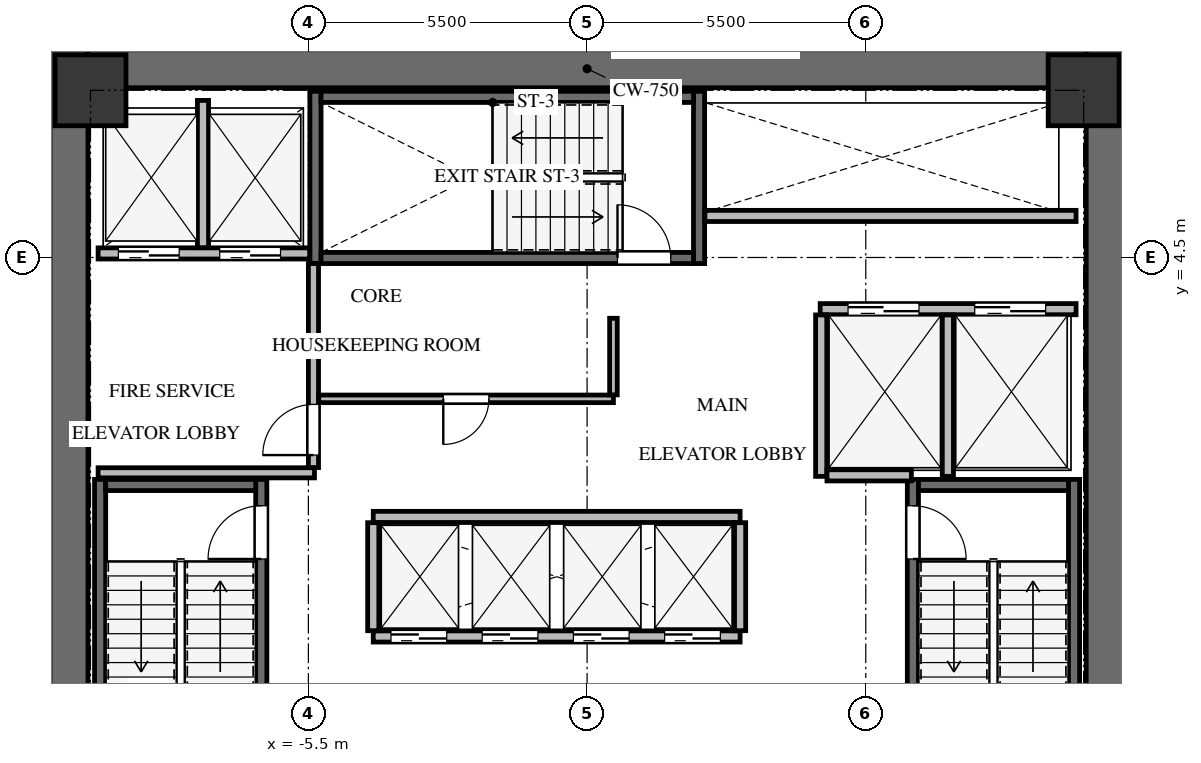
"""IFC4 building model, lengths in metres.
Left out: names, types, materials, properties, quantities, classifications, styles, units other than length and angle.
Written with IfcOpenShell. Run it as: python <this file> out.ifc"""

import sys

from ifc_helpers import new_model, si_unit, direction, frame, frame_2d, origin, origin_2d, place, context, subcontext, project, spatial, rectangle, extrude, source, transform, mapped, element, fill, save


model = new_model("IFC4")
c1 = context("Model", 3, precision=1e-05, world=origin(), true_north=direction((0.0, 1.0)))
c2 = subcontext(c1, "Body", "Model", "MODEL_VIEW")
j1 = project(units=[si_unit("LENGTHUNIT", "METRE"), si_unit("PLANEANGLEUNIT", "RADIAN")], contexts=[c1])
p1 = place(None, origin())
s1 = spatial("IfcSite", under=j1, at=p1, CompositionType="ELEMENT")
p2 = place(p1, origin())
s2 = spatial("IfcBuilding", under=s1, at=p2, CompositionType="ELEMENT")
p3 = place(p2, frame((0.0, 0.0, 127.2)))
s3 = spatial("IfcBuildingStorey", under=s2, at=p3, CompositionType="ELEMENT", Elevation=127.2)
for number, where, z_axis, x_axis in (
    (1, (-10.225, -8.6, 0.0), (0.0, 0.0, 1.0), (0.0, 1.0, 0.0)),
    (2, (10.225, -8.6, 0.0), (0.0, 0.0, 1.0), (0.0, 1.0, 0.0)),
):
    element("IfcWall", number, at=place(p3, frame(where, z_axis=z_axis, x_axis=x_axis)), inside=s3, PredefinedType="SHEAR", context=c2, shape_type="SweptSolid", body=[
        extrude(rectangle(XDim=17.2, YDim=0.75, at=frame_2d((8.6, 0.0))), origin(), (0.0, 0.0, 1.0), 3.3),
    ])
p4 = place(p3, frame((-9.85, 8.225, 0.0), z_axis=(0.0, 0.0, 1.0), x_axis=(1.0, 0.0, 0.0)))
e3 = element("IfcWall", 3, at=p4, inside=s3, PredefinedType="SHEAR", context=c2, shape_type="SweptSolid", body=[
    extrude(rectangle(XDim=19.7, YDim=0.75, at=frame_2d((9.85, 0.0))), origin(), (0.0, 0.0, 1.0), 3.3),
])
p5 = place(p3, frame((-6.43, -7.77, -0.24), z_axis=(0.0, 0.0, 1.0), x_axis=(0.0, 1.0, 0.0)))
e4 = element("IfcWall", 4, at=p5, inside=s3, PredefinedType="SHEAR", context=c2, shape_type="SweptSolid", body=[
    extrude(rectangle(XDim=7.89, YDim=0.22, at=frame_2d((3.945, 0.0))), origin(), (0.0, 0.0, 1.0), 3.3),
])
p6 = place(p5, frame((6.32, 0.0, 0.0)))
e5 = element("IfcOpeningElement", 5, at=p6, cuts=e4, PredefinedType="OPENING", context=c2, shape_type="SweptSolid", body=[
    extrude(rectangle(XDim=1.05, YDim=2.15, at=frame_2d((0.525, 1.075))), frame((0.0, 0.12, 0.0), z_axis=(0.0, -1.0, 0.0), x_axis=(1.0, 0.0, 0.0)), (0.0, 0.0, 1.0), 0.24),
])
p7 = place(p3, frame((-9.61, 0.12, -0.24), z_axis=(0.0, 0.0, 1.0), x_axis=(0.0, -1.0, 0.0)))
e6 = element("IfcWall", 6, at=p7, inside=s3, PredefinedType="SHEAR", context=c2, shape_type="SweptSolid", body=[
    extrude(rectangle(XDim=7.89, YDim=0.22, at=frame_2d((3.945, 0.0))), origin(), (0.0, 0.0, 1.0), 3.3),
])
p8 = place(p3, frame((-6.54, 0.01, -0.24), z_axis=(0.0, 0.0, 1.0), x_axis=(-1.0, 0.0, 0.0)))
e7 = element("IfcWall", 7, at=p8, inside=s3, PredefinedType="SHEAR", context=c2, shape_type="SweptSolid", body=[
    extrude(rectangle(XDim=2.96, YDim=0.22, at=frame_2d((1.48, 0.0))), origin(), (0.0, 0.0, 1.0), 3.3),
])
p9 = place(p3, frame((9.61, -7.77, -0.24), z_axis=(0.0, 0.0, 1.0), x_axis=(0.0, 1.0, 0.0)))
e8 = element("IfcWall", 8, at=p9, inside=s3, PredefinedType="SHEAR", context=c2, shape_type="SweptSolid", body=[
    extrude(rectangle(XDim=7.89, YDim=0.22, at=frame_2d((3.945, 0.0))), origin(), (0.0, 0.0, 1.0), 3.3),
])
p10 = place(p3, frame((6.43, 0.12, -0.24), z_axis=(0.0, 0.0, 1.0), x_axis=(0.0, -1.0, 0.0)))
e9 = element("IfcWall", 9, at=p10, inside=s3, PredefinedType="SHEAR", context=c2, shape_type="SweptSolid", body=[
    extrude(rectangle(XDim=7.89, YDim=0.22, at=frame_2d((3.945, 0.0))), origin(), (0.0, 0.0, 1.0), 3.3),
])
p11 = place(p10, frame((0.52, 0.0, 0.0)))
e10 = element("IfcOpeningElement", 10, at=p11, cuts=e9, PredefinedType="OPENING", context=c2, shape_type="SweptSolid", body=[
    extrude(rectangle(XDim=1.05, YDim=2.15, at=frame_2d((0.525, 1.075))), frame((0.0, 0.12, 0.0), z_axis=(0.0, -1.0, 0.0), x_axis=(1.0, 0.0, 0.0)), (0.0, 0.0, 1.0), 0.24),
])
p12 = place(p3, frame((9.5, 0.01, -0.24), z_axis=(0.0, 0.0, 1.0), x_axis=(-1.0, 0.0, 0.0)))
e11 = element("IfcWall", 11, at=p12, inside=s3, PredefinedType="SHEAR", context=c2, shape_type="SweptSolid", body=[
    extrude(rectangle(XDim=2.96, YDim=0.22, at=frame_2d((1.48, 0.0))), origin(), (0.0, 0.0, 1.0), 3.3),
])
for number, where, z_axis, x_axis in (
    (12, (2.21, 4.38, -0.24), (0.0, 0.0, 1.0), (0.0, 1.0, 0.0)),
    (13, (-5.36, 7.78, -0.24), (0.0, 0.0, 1.0), (0.0, -1.0, 0.0)),
):
    element("IfcWall", number, at=place(p3, frame(where, z_axis=z_axis, x_axis=x_axis)), inside=s3, PredefinedType="SHEAR", context=c2, shape_type="SweptSolid", body=[
        extrude(rectangle(XDim=3.4, YDim=0.22, at=frame_2d((1.7, 0.0))), origin(), (0.0, 0.0, 1.0), 3.3),
    ])
p13 = place(p3, frame((-5.25, 4.49, -0.24), z_axis=(0.0, 0.0, 1.0), x_axis=(1.0, 0.0, 0.0)))
e14 = element("IfcWall", 14, at=p13, inside=s3, PredefinedType="SHEAR", context=c2, shape_type="SweptSolid", body=[
    extrude(rectangle(XDim=7.35, YDim=0.22, at=frame_2d((3.675, 0.0))), origin(), (0.0, 0.0, 1.0), 3.3),
])
p14 = place(p13, frame((5.85, 0.0, 0.0)))
e15 = element("IfcOpeningElement", 15, at=p14, cuts=e14, PredefinedType="OPENING", context=c2, shape_type="SweptSolid", body=[
    extrude(rectangle(XDim=1.05, YDim=2.15, at=frame_2d((0.525, 1.075))), frame((0.0, 0.12, 0.0), z_axis=(0.0, -1.0, 0.0), x_axis=(1.0, 0.0, 0.0)), (0.0, 0.0, 1.0), 0.24),
])
p15 = place(p3, frame((2.1, 7.67, -0.24), z_axis=(0.0, 0.0, 1.0), x_axis=(-1.0, 0.0, 0.0)))
e16 = element("IfcWall", 16, at=p15, inside=s3, PredefinedType="SHEAR", context=c2, shape_type="SweptSolid", body=[
    extrude(rectangle(XDim=7.35, YDim=0.22, at=frame_2d((3.675, 0.0))), origin(), (0.0, 0.0, 1.0), 3.3),
])
m1 = source(origin(), c2, "Body", "SweptSolid", [
    extrude(rectangle(XDim=1.4, YDim=1.4, at=origin_2d()), origin(), (0.0, 0.0, 1.0), 3.3),
])
for number, where, z_axis, x_axis in (
    (17, (9.8, 7.8, -0.24), (0.0, 0.0, 1.0), (1.0, 0.0, 0.0)),
    (18, (-9.8, 7.8, -0.24), (0.0, 0.0, 1.0), (1.0, 0.0, 0.0)),
):
    element("IfcColumn", number, at=place(p3, frame(where, z_axis=z_axis, x_axis=x_axis)), inside=s3, PredefinedType="COLUMN", context=c2, shape_type="MappedRepresentation", body=[
        mapped(m1, transform((0.0, 0.0, 0.0), x_axis=(1.0, 0.0, 0.0), y_axis=(0.0, 1.0, 0.0), z_axis=(0.0, 0.0, 1.0), scale=1.0)),
    ])
p16 = place(p3, frame((-9.65, 4.58, 0.0), z_axis=(0.0, 0.0, 1.0), x_axis=(1.0, 0.0, 0.0)))
e19 = element("IfcWall", 19, at=p16, inside=s3, PredefinedType="SOLIDWALL", context=c2, shape_type="SweptSolid", body=[
    extrude(rectangle(XDim=4.175, YDim=0.22, at=frame_2d((2.087, 0.0))), origin(), (0.0, 0.0, 1.0), 3.045),
])
p17 = place(p16, frame((0.4, 0.0, 0.0)))
e20 = element("IfcOpeningElement", 20, at=p17, cuts=e19, PredefinedType="OPENING", context=c2, shape_type="SweptSolid", body=[
    extrude(rectangle(XDim=1.2, YDim=2.15, at=frame_2d((0.6, 1.075))), frame((0.0, 0.12, 0.0), z_axis=(0.0, -1.0, 0.0), x_axis=(1.0, 0.0, 0.0)), (0.0, 0.0, 1.0), 0.24),
])
p18 = place(p16, frame((2.4, 0.0, 0.0)))
e21 = element("IfcOpeningElement", 21, at=p18, cuts=e19, PredefinedType="OPENING", context=c2, shape_type="SweptSolid", body=[
    extrude(rectangle(XDim=1.2, YDim=2.15, at=frame_2d((0.6, 1.075))), frame((0.0, 0.12, 0.0), z_axis=(0.0, -1.0, 0.0), x_axis=(1.0, 0.0, 0.0)), (0.0, 0.0, 1.0), 0.24),
])
p19 = place(p3, frame((-7.58, 4.694, 0.0), z_axis=(0.0, 0.0, 1.0), x_axis=(0.0, 1.0, 0.0)))
e22 = element("IfcWall", 22, at=p19, inside=s3, PredefinedType="SOLIDWALL", context=c2, shape_type="SweptSolid", body=[
    extrude(rectangle(XDim=2.906, YDim=0.22, at=frame_2d((1.453, 0.0))), origin(), (0.0, 0.0, 1.0), 3.045),
])
p20 = place(p3, frame((-9.65, 0.25, 0.0), z_axis=(0.0, 0.0, 1.0), x_axis=(1.0, 0.0, 0.0)))
e23 = element("IfcWall", 23, at=p20, inside=s3, PredefinedType="SOLIDWALL", context=c2, shape_type="SweptSolid", body=[
    extrude(rectangle(XDim=4.27, YDim=0.2, at=frame_2d((2.135, 0.0))), origin(), (0.0, 0.0, 1.0), 3.045),
])
p21 = place(p3, frame((-5.4, 0.354, 0.0), z_axis=(0.0, 0.0, 1.0), x_axis=(0.0, 1.0, 0.0)))
e24 = element("IfcWall", 24, at=p21, inside=s3, PredefinedType="SOLIDWALL", context=c2, shape_type="SweptSolid", body=[
    extrude(rectangle(XDim=4.026, YDim=0.2, at=frame_2d((2.013, 0.0))), origin(), (0.0, 0.0, 1.0), 3.045),
])
p22 = place(p21, frame((0.246, 0.0, 0.0)))
e25 = element("IfcOpeningElement", 25, at=p22, cuts=e24, PredefinedType="OPENING", context=c2, shape_type="SweptSolid", body=[
    extrude(rectangle(XDim=1.0, YDim=2.15, at=frame_2d((0.5, 1.075))), frame((0.0, 0.11, 0.0), z_axis=(0.0, -1.0, 0.0), x_axis=(1.0, 0.0, 0.0)), (0.0, 0.0, 1.0), 0.22),
])
p23 = place(p3, frame((4.6, 3.48, 0.0), z_axis=(0.0, 0.0, 1.0), x_axis=(1.0, 0.0, 0.0)))
e26 = element("IfcWall", 26, at=p23, inside=s3, PredefinedType="SOLIDWALL", context=c2, shape_type="SweptSolid", body=[
    extrude(rectangle(XDim=5.05, YDim=0.22, at=frame_2d((2.525, 0.0))), origin(), (0.0, 0.0, 1.0), 3.045),
])
p24 = place(p23, frame((0.55, 0.0, 0.0)))
e27 = element("IfcOpeningElement", 27, at=p24, cuts=e26, PredefinedType="OPENING", context=c2, shape_type="SweptSolid", body=[
    extrude(rectangle(XDim=1.4, YDim=2.15, at=frame_2d((0.7, 1.075))), frame((0.0, 0.12, 0.0), z_axis=(0.0, -1.0, 0.0), x_axis=(1.0, 0.0, 0.0)), (0.0, 0.0, 1.0), 0.24),
])
p25 = place(p23, frame((3.05, 0.0, 0.0)))
e28 = element("IfcOpeningElement", 28, at=p25, cuts=e26, PredefinedType="OPENING", context=c2, shape_type="SweptSolid", body=[
    extrude(rectangle(XDim=1.4, YDim=2.15, at=frame_2d((0.7, 1.075))), frame((0.0, 0.12, 0.0), z_axis=(0.0, -1.0, 0.0), x_axis=(1.0, 0.0, 0.0)), (0.0, 0.0, 1.0), 0.24),
])
for number, where, z_axis, x_axis in (
    (29, (4.62, 0.18, 0.0), (0.0, 0.0, 1.0), (0.0, 1.0, 0.0)),
    (30, (7.12, 0.18, 0.0), (0.0, 0.0, 1.0), (0.0, 1.0, 0.0)),
):
    element("IfcWall", number, at=place(p3, frame(where, z_axis=z_axis, x_axis=x_axis)), inside=s3, PredefinedType="SOLIDWALL", context=c2, shape_type="SweptSolid", body=[
        extrude(rectangle(XDim=3.186, YDim=0.22, at=frame_2d((1.593, 0.0))), origin(), (0.0, 0.0, 1.0), 3.045),
    ])
p26 = place(p3, frame((4.734, 0.2, 0.0), z_axis=(0.0, 0.0, 1.0), x_axis=(1.0, 0.0, 0.0)))
e31 = element("IfcWall", 31, at=p26, inside=s3, PredefinedType="SOLIDWALL", context=c2, shape_type="SweptSolid", body=[
    extrude(rectangle(XDim=1.666, YDim=0.22, at=frame_2d((0.833, 0.0))), origin(), (0.0, 0.0, 1.0), 3.045),
])
p27 = place(p3, frame((-4.22, -2.98, 0.0), z_axis=(0.0, 0.0, 1.0), x_axis=(1.0, 0.0, 0.0)))
e32 = element("IfcWall", 32, at=p27, inside=s3, PredefinedType="SOLIDWALL", context=c2, shape_type="SweptSolid", body=[
    extrude(rectangle(XDim=7.24, YDim=0.22, at=frame_2d((3.62, 0.0))), origin(), (0.0, 0.0, 1.0), 3.045),
])
p28 = place(p27, frame((0.35, 0.0, 0.0)))
e33 = element("IfcOpeningElement", 33, at=p28, cuts=e32, PredefinedType="OPENING", context=c2, shape_type="SweptSolid", body=[
    extrude(rectangle(XDim=1.1, YDim=2.15, at=frame_2d((0.55, 1.075))), frame((0.0, 0.12, 0.0), z_axis=(0.0, -1.0, 0.0), x_axis=(1.0, 0.0, 0.0)), (0.0, 0.0, 1.0), 0.24),
])
p29 = place(p27, frame((2.15, 0.0, 0.0)))
e34 = element("IfcOpeningElement", 34, at=p29, cuts=e32, PredefinedType="OPENING", context=c2, shape_type="SweptSolid", body=[
    extrude(rectangle(XDim=1.1, YDim=2.15, at=frame_2d((0.55, 1.075))), frame((0.0, 0.12, 0.0), z_axis=(0.0, -1.0, 0.0), x_axis=(1.0, 0.0, 0.0)), (0.0, 0.0, 1.0), 0.24),
])
p30 = place(p27, frame((3.95, 0.0, 0.0)))
e35 = element("IfcOpeningElement", 35, at=p30, cuts=e32, PredefinedType="OPENING", context=c2, shape_type="SweptSolid", body=[
    extrude(rectangle(XDim=1.1, YDim=2.15, at=frame_2d((0.55, 1.075))), frame((0.0, 0.12, 0.0), z_axis=(0.0, -1.0, 0.0), x_axis=(1.0, 0.0, 0.0)), (0.0, 0.0, 1.0), 0.24),
])
p31 = place(p27, frame((5.75, 0.0, 0.0)))
e36 = element("IfcOpeningElement", 36, at=p31, cuts=e32, PredefinedType="OPENING", context=c2, shape_type="SweptSolid", body=[
    extrude(rectangle(XDim=1.1, YDim=2.15, at=frame_2d((0.55, 1.075))), frame((0.0, 0.12, 0.0), z_axis=(0.0, -1.0, 0.0), x_axis=(1.0, 0.0, 0.0)), (0.0, 0.0, 1.0), 0.24),
])
p32 = place(p3, frame((-4.22, -0.62, 0.0), z_axis=(0.0, 0.0, 1.0), x_axis=(1.0, 0.0, 0.0)))
e37 = element("IfcWall", 37, at=p32, inside=s3, PredefinedType="SOLIDWALL", context=c2, shape_type="SweptSolid", body=[
    extrude(rectangle(XDim=7.24, YDim=0.22, at=frame_2d((3.62, 0.0))), origin(), (0.0, 0.0, 1.0), 3.045),
])
for number, where, z_axis, x_axis in (
    (38, (-4.22, -2.866, 0.0), (0.0, 0.0, 1.0), (0.0, 1.0, 0.0)),
    (39, (3.02, -2.866, 0.0), (0.0, 0.0, 1.0), (0.0, 1.0, 0.0)),
):
    element("IfcWall", number, at=place(p3, frame(where, z_axis=z_axis, x_axis=x_axis)), inside=s3, PredefinedType="SOLIDWALL", context=c2, shape_type="SweptSolid", body=[
        extrude(rectangle(XDim=2.132, YDim=0.22, at=frame_2d((1.066, 0.0))), origin(), (0.0, 0.0, 1.0), 3.045),
    ])
p33 = place(p3, frame((2.325, 5.32, 0.0), z_axis=(0.0, 0.0, 1.0), x_axis=(1.0, 0.0, 0.0)))
e40 = element("IfcWall", 40, at=p33, inside=s3, PredefinedType="SOLIDWALL", context=c2, shape_type="SweptSolid", body=[
    extrude(rectangle(XDim=7.325, YDim=0.22, at=frame_2d((3.663, 0.0))), origin(), (0.0, 0.0, 1.0), 3.045),
])
p34 = place(p3, frame((0.52, 1.71, 0.0), z_axis=(0.0, 0.0, 1.0), x_axis=(-1.0, 0.0, 0.0)))
e41 = element("IfcWall", 41, at=p34, inside=s3, PredefinedType="PARTITIONING", context=c2, shape_type="SweptSolid", body=[
    extrude(rectangle(XDim=5.816, YDim=0.15, at=frame_2d((2.908, 0.0))), origin(), (0.0, 0.0, 1.0), 3.045),
])
p35 = place(p34, frame((2.458, 0.0, 0.0)))
e42 = element("IfcOpeningElement", 42, at=p35, cuts=e41, PredefinedType="OPENING", context=c2, shape_type="SweptSolid", body=[
    extrude(rectangle(XDim=0.9, YDim=2.05, at=frame_2d((0.45, 1.025))), frame((0.0, 0.085, 0.0), z_axis=(0.0, -1.0, 0.0), x_axis=(1.0, 0.0, 0.0)), (0.0, 0.0, 1.0), 0.17),
])
p36 = place(p3, frame((0.52, 3.3, 0.0), z_axis=(0.0, 0.0, 1.0), x_axis=(0.0, -1.0, 0.0)))
e43 = element("IfcWall", 43, at=p36, inside=s3, PredefinedType="PARTITIONING", context=c2, shape_type="SweptSolid", body=[
    extrude(rectangle(XDim=1.511, YDim=0.15, at=frame_2d((0.755, 0.0))), origin(), (0.0, 0.0, 1.0), 3.045),
])
m2 = source(origin(), c2, "Body", "SweptSolid", [
    extrude(rectangle(XDim=1.05, YDim=2.15, at=frame_2d((0.525, 1.075))), frame((0.0, 0.025, 0.0), z_axis=(0.0, -1.0, 0.0), x_axis=(1.0, 0.0, 0.0)), (0.0, 0.0, 1.0), 0.05),
])
p37 = place(p6, origin())
e44 = element("IfcDoor", 44, at=p37, inside=s3, OperationType="SINGLE_SWING_LEFT", PredefinedType="DOOR", context=c2, shape_type="MappedRepresentation", body=[
    mapped(m2, transform((0.0, 0.0, 0.0), x_axis=(1.0, 0.0, 0.0), y_axis=(0.0, 1.0, 0.0), z_axis=(0.0, 0.0, 1.0), scale=1.0)),
])
fill(e5, e44)
m3 = source(origin(), c2, "Body", "SweptSolid", [
    extrude(rectangle(XDim=1.05, YDim=2.15, at=frame_2d((0.525, 1.075))), frame((0.0, 0.025, 0.0), z_axis=(0.0, -1.0, 0.0), x_axis=(1.0, 0.0, 0.0)), (0.0, 0.0, 1.0), 0.05),
])
p38 = place(p11, origin())
e45 = element("IfcDoor", 45, at=p38, inside=s3, OperationType="SINGLE_SWING_RIGHT", PredefinedType="DOOR", context=c2, shape_type="MappedRepresentation", body=[
    mapped(m3, transform((0.0, 0.0, 0.0), x_axis=(1.0, 0.0, 0.0), y_axis=(0.0, 1.0, 0.0), z_axis=(0.0, 0.0, 1.0), scale=1.0)),
])
fill(e10, e45)
p39 = place(p14, origin())
e46 = element("IfcDoor", 46, at=p39, inside=s3, OperationType="SINGLE_SWING_LEFT", PredefinedType="DOOR", context=c2, shape_type="MappedRepresentation", body=[
    mapped(m2, transform((0.0, 0.0, 0.0), x_axis=(1.0, 0.0, 0.0), y_axis=(0.0, 1.0, 0.0), z_axis=(0.0, 0.0, 1.0), scale=1.0)),
])
fill(e15, e46)
m4 = source(origin(), c2, "Body", "SweptSolid", [
    extrude(rectangle(XDim=1.2, YDim=2.15, at=frame_2d((0.6, 1.075))), frame((0.0, 0.025, 0.0), z_axis=(0.0, -1.0, 0.0), x_axis=(1.0, 0.0, 0.0)), (0.0, 0.0, 1.0), 0.05),
])
p40 = place(p17, origin())
e47 = element("IfcDoor", 47, at=p40, inside=s3, OperationType="DOUBLE_DOOR_SLIDING", PredefinedType="DOOR", context=c2, shape_type="MappedRepresentation", body=[
    mapped(m4, transform((0.0, 0.0, 0.0), x_axis=(1.0, 0.0, 0.0), y_axis=(0.0, 1.0, 0.0), z_axis=(0.0, 0.0, 1.0), scale=1.0)),
])
fill(e20, e47)
p41 = place(p18, origin())
e48 = element("IfcDoor", 48, at=p41, inside=s3, OperationType="DOUBLE_DOOR_SLIDING", PredefinedType="DOOR", context=c2, shape_type="MappedRepresentation", body=[
    mapped(m4, transform((0.0, 0.0, 0.0), x_axis=(1.0, 0.0, 0.0), y_axis=(0.0, 1.0, 0.0), z_axis=(0.0, 0.0, 1.0), scale=1.0)),
])
fill(e21, e48)
m5 = source(origin(), c2, "Body", "SweptSolid", [
    extrude(rectangle(XDim=1.0, YDim=2.15, at=frame_2d((0.5, 1.075))), frame((0.0, 0.025, 0.0), z_axis=(0.0, -1.0, 0.0), x_axis=(1.0, 0.0, 0.0)), (0.0, 0.0, 1.0), 0.05),
])
p42 = place(p22, origin())
e49 = element("IfcDoor", 49, at=p42, inside=s3, OperationType="SINGLE_SWING_LEFT", PredefinedType="DOOR", context=c2, shape_type="MappedRepresentation", body=[
    mapped(m5, transform((0.0, 0.0, 0.0), x_axis=(1.0, 0.0, 0.0), y_axis=(0.0, 1.0, 0.0), z_axis=(0.0, 0.0, 1.0), scale=1.0)),
])
fill(e25, e49)
m6 = source(origin(), c2, "Body", "SweptSolid", [
    extrude(rectangle(XDim=1.4, YDim=2.15, at=frame_2d((0.7, 1.075))), frame((0.0, 0.025, 0.0), z_axis=(0.0, -1.0, 0.0), x_axis=(1.0, 0.0, 0.0)), (0.0, 0.0, 1.0), 0.05),
])
p43 = place(p24, origin())
e50 = element("IfcDoor", 50, at=p43, inside=s3, OperationType="DOUBLE_DOOR_SLIDING", PredefinedType="DOOR", context=c2, shape_type="MappedRepresentation", body=[
    mapped(m6, transform((0.0, 0.0, 0.0), x_axis=(1.0, 0.0, 0.0), y_axis=(0.0, 1.0, 0.0), z_axis=(0.0, 0.0, 1.0), scale=1.0)),
])
fill(e27, e50)
p44 = place(p25, origin())
e51 = element("IfcDoor", 51, at=p44, inside=s3, OperationType="DOUBLE_DOOR_SLIDING", PredefinedType="DOOR", context=c2, shape_type="MappedRepresentation", body=[
    mapped(m6, transform((0.0, 0.0, 0.0), x_axis=(1.0, 0.0, 0.0), y_axis=(0.0, 1.0, 0.0), z_axis=(0.0, 0.0, 1.0), scale=1.0)),
])
fill(e28, e51)
m7 = source(origin(), c2, "Body", "SweptSolid", [
    extrude(rectangle(XDim=1.1, YDim=2.15, at=frame_2d((0.55, 1.075))), frame((0.0, 0.025, 0.0), z_axis=(0.0, -1.0, 0.0), x_axis=(1.0, 0.0, 0.0)), (0.0, 0.0, 1.0), 0.05),
])
p45 = place(p28, origin())
e52 = element("IfcDoor", 52, at=p45, inside=s3, OperationType="DOUBLE_DOOR_SLIDING", PredefinedType="DOOR", context=c2, shape_type="MappedRepresentation", body=[
    mapped(m7, transform((0.0, 0.0, 0.0), x_axis=(1.0, 0.0, 0.0), y_axis=(0.0, 1.0, 0.0), z_axis=(0.0, 0.0, 1.0), scale=1.0)),
])
fill(e33, e52)
p46 = place(p29, origin())
e53 = element("IfcDoor", 53, at=p46, inside=s3, OperationType="DOUBLE_DOOR_SLIDING", PredefinedType="DOOR", context=c2, shape_type="MappedRepresentation", body=[
    mapped(m7, transform((0.0, 0.0, 0.0), x_axis=(1.0, 0.0, 0.0), y_axis=(0.0, 1.0, 0.0), z_axis=(0.0, 0.0, 1.0), scale=1.0)),
])
fill(e34, e53)
p47 = place(p30, origin())
e54 = element("IfcDoor", 54, at=p47, inside=s3, OperationType="DOUBLE_DOOR_SLIDING", PredefinedType="DOOR", context=c2, shape_type="MappedRepresentation", body=[
    mapped(m7, transform((0.0, 0.0, 0.0), x_axis=(1.0, 0.0, 0.0), y_axis=(0.0, 1.0, 0.0), z_axis=(0.0, 0.0, 1.0), scale=1.0)),
])
fill(e35, e54)
p48 = place(p31, origin())
e55 = element("IfcDoor", 55, at=p48, inside=s3, OperationType="DOUBLE_DOOR_SLIDING", PredefinedType="DOOR", context=c2, shape_type="MappedRepresentation", body=[
    mapped(m7, transform((0.0, 0.0, 0.0), x_axis=(1.0, 0.0, 0.0), y_axis=(0.0, 1.0, 0.0), z_axis=(0.0, 0.0, 1.0), scale=1.0)),
])
fill(e36, e55)
m8 = source(origin(), c2, "Body", "SweptSolid", [
    extrude(rectangle(XDim=0.9, YDim=2.05, at=frame_2d((0.45, 1.025))), frame((0.0, 0.025, 0.0), z_axis=(0.0, -1.0, 0.0), x_axis=(1.0, 0.0, 0.0)), (0.0, 0.0, 1.0), 0.05),
])
p49 = place(p35, origin())
e56 = element("IfcDoor", 56, at=p49, inside=s3, OperationType="SINGLE_SWING_RIGHT", PredefinedType="DOOR", context=c2, shape_type="MappedRepresentation", body=[
    mapped(m8, transform((0.0, 0.0, 0.0), x_axis=(1.0, 0.0, 0.0), y_axis=(0.0, 1.0, 0.0), z_axis=(0.0, 0.0, 1.0), scale=1.0)),
])
fill(e42, e56)
save(model, sys.argv[1])
